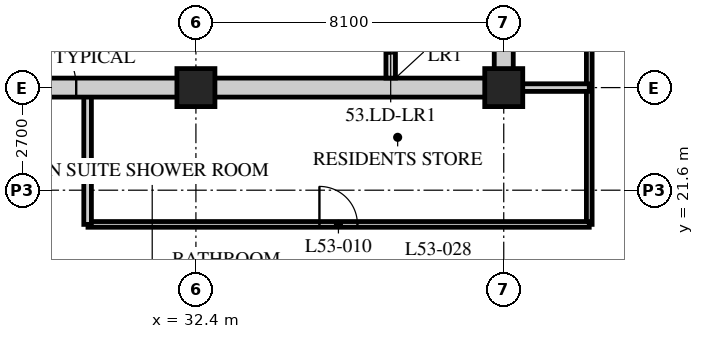
"""IFC4 building model, lengths in metres.
Left out: names, types, materials, properties, quantities, classifications, styles, units other than length and angle.
Written with IfcOpenShell. Run it as: python <this file> out.ifc"""

import sys

from ifc_helpers import new_model, si_unit, direction, frame, frame_2d, origin, origin_2d, place, context, subcontext, project, spatial, rectangle, hollow_rectangle, extrude, element, fill, save


model = new_model("IFC4")
c1 = context("Model", 3, precision=1e-05, world=origin(), true_north=direction((0.0, 1.0)))
c2 = subcontext(c1, "Body", "Model", "MODEL_VIEW")
j1 = project(units=[si_unit("LENGTHUNIT", "METRE"), si_unit("PLANEANGLEUNIT", "RADIAN")], contexts=[c1])
p1 = place(None, origin())
s1 = spatial("IfcSite", under=j1, at=p1, CompositionType="ELEMENT")
p2 = place(p1, origin())
s2 = spatial("IfcBuilding", under=s1, at=p2, CompositionType="ELEMENT")
p3 = place(p2, frame((0.0, 0.0, 206.4)))
s3 = spatial("IfcBuildingStorey", under=s2, at=p3, CompositionType="ELEMENT", Elevation=206.4)
for number, where, z_axis, x_axis in (
    (1, (32.4, 24.3, 0.0), (0.0, 0.0, 1.0), (1.0, 0.0, 0.0)),
    (2, (40.5, 24.3, 0.0), (0.0, 0.0, 1.0), (1.0, 0.0, 0.0)),
):
    element("IfcColumn", number, at=place(p3, frame(where, z_axis=z_axis, x_axis=x_axis)), inside=s3, PredefinedType="COLUMN", context=c2, shape_type="SweptSolid", body=[
        extrude(hollow_rectangle(XDim=1.0, YDim=1.0, WallThickness=0.1, at=origin_2d()), origin(), (0.0, 0.0, 1.0), 3.6),
    ])
p4 = place(p3, frame((42.75, 20.7, 0.0), z_axis=(0.0, 0.0, 1.0), x_axis=(0.0, 1.0, 0.0)))
e3 = element("IfcWall", 3, at=p4, inside=s3, PredefinedType="PARTITIONING", context=c2, shape_type="SweptSolid", body=[
    extrude(rectangle(XDim=24.75, YDim=0.15, at=frame_2d((12.375, 0.0))), origin(), (0.0, 0.0, 1.0), 3.39),
])
p5 = place(p4, frame((7.15, 0.0, 0.0)))
e4 = element("IfcOpeningElement", 4, at=p5, cuts=e3, PredefinedType="OPENING", context=c2, shape_type="SweptSolid", body=[
    extrude(rectangle(XDim=1.0, YDim=2.1, at=frame_2d((0.5, 1.05))), frame((0.0, 0.085, 0.0), z_axis=(0.0, -1.0, 0.0), x_axis=(1.0, 0.0, 0.0)), (0.0, 0.0, 1.0), 0.17),
])
p6 = place(p4, frame((15.25, 0.0, 0.0)))
e5 = element("IfcOpeningElement", 5, at=p6, cuts=e3, PredefinedType="OPENING", context=c2, shape_type="SweptSolid", body=[
    extrude(rectangle(XDim=1.0, YDim=2.1, at=frame_2d((0.5, 1.05))), frame((0.0, 0.085, 0.0), z_axis=(0.0, -1.0, 0.0), x_axis=(1.0, 0.0, 0.0)), (0.0, 0.0, 1.0), 0.17),
])
p7 = place(p3, frame((29.56, 20.7, 0.0), z_axis=(0.0, 0.0, 1.0), x_axis=(1.0, 0.0, 0.0)))
e6 = element("IfcWall", 6, at=p7, inside=s3, PredefinedType="PARTITIONING", context=c2, shape_type="SweptSolid", body=[
    extrude(rectangle(XDim=13.19, YDim=0.15, at=frame_2d((6.595, 0.0))), origin(), (0.0, 0.0, 1.0), 3.39),
])
p8 = place(p7, frame((6.09, 0.0, 0.0)))
e7 = element("IfcOpeningElement", 7, at=p8, cuts=e6, PredefinedType="OPENING", context=c2, shape_type="SweptSolid", body=[
    extrude(rectangle(XDim=1.0, YDim=2.1, at=frame_2d((0.5, 1.05))), frame((0.0, 0.085, 0.0), z_axis=(0.0, -1.0, 0.0), x_axis=(1.0, 0.0, 0.0)), (0.0, 0.0, 1.0), 0.17),
])
p9 = place(p3, frame((29.55, 20.7, 0.0), z_axis=(0.0, 0.0, 1.0), x_axis=(0.0, 1.0, 0.0)))
e8 = element("IfcWall", 8, at=p9, inside=s3, PredefinedType="SOLIDWALL", context=c2, shape_type="SweptSolid", body=[
    extrude(rectangle(XDim=3.6, YDim=0.2, at=frame_2d((1.8, 0.0))), origin(), (0.0, 0.0, 1.0), 3.39),
])
p10 = place(p3, frame((40.5, 24.3, 0.0), z_axis=(0.0, 0.0, 1.0), x_axis=(1.0, 0.0, 0.0)))
e9 = element("IfcWall", 9, at=p10, inside=s3, PredefinedType="SOLIDWALL", context=c2, shape_type="SweptSolid", body=[
    extrude(rectangle(XDim=2.25, YDim=0.2, at=frame_2d((1.125, 0.0))), origin(), (0.0, 0.0, 1.0), 3.39),
])
p11 = place(p3, frame((15.95, 24.3, 0.0), z_axis=(0.0, 0.0, 1.0), x_axis=(1.0, 0.0, 0.0)))
e10 = element("IfcWall", 10, at=p11, inside=s3, PredefinedType="SOLIDWALL", context=c2, shape_type="SweptSolid", body=[
    extrude(rectangle(XDim=24.8, YDim=0.5, at=frame_2d((12.4, 0.0))), origin(), (0.0, 0.0, 1.0), 2.74),
])
p12 = place(p11, frame((11.5, 0.0, 0.0)))
e11 = element("IfcOpeningElement", 11, at=p12, cuts=e10, PredefinedType="OPENING", context=c2, shape_type="SweptSolid", body=[
    extrude(rectangle(XDim=1.8, YDim=2.4, at=frame_2d((0.9, 1.2))), frame((0.0, 0.26, 0.0), z_axis=(0.0, -1.0, 0.0), x_axis=(1.0, 0.0, 0.0)), (0.0, 0.0, 1.0), 0.52),
])
p13 = place(p3, frame((40.5, 24.55, 0.0), z_axis=(0.0, 0.0, 1.0), x_axis=(0.0, 1.0, 0.0)))
e12 = element("IfcWall", 12, at=p13, inside=s3, PredefinedType="SOLIDWALL", context=c2, shape_type="SweptSolid", body=[
    extrude(rectangle(XDim=15.7, YDim=0.5, at=frame_2d((7.85, 0.0))), origin(), (0.0, 0.0, 1.0), 2.778),
])
p14 = place(p3, frame((37.525, 24.55, 0.0), z_axis=(0.0, 0.0, 1.0), x_axis=(0.0, 1.0, 0.0)))
e13 = element("IfcWall", 13, at=p14, inside=s3, PredefinedType="SOLIDWALL", context=c2, shape_type="SweptSolid", body=[
    extrude(rectangle(XDim=7.75, YDim=0.25, at=frame_2d((3.875, 0.0))), origin(), (0.0, 0.0, 1.0), 3.39),
])
p15 = place(p14, frame((0.65, 0.0, 0.0)))
e14 = element("IfcOpeningElement", 14, at=p15, cuts=e13, PredefinedType="OPENING", context=c2, shape_type="SweptSolid", body=[
    extrude(rectangle(XDim=1.1, YDim=2.4, at=frame_2d((0.55, 1.2))), frame((0.0, 0.135, 0.0), z_axis=(0.0, -1.0, 0.0), x_axis=(1.0, 0.0, 0.0)), (0.0, 0.0, 1.0), 0.27),
])
p16 = place(p14, frame((3.25, 0.0, 0.0)))
e15 = element("IfcOpeningElement", 15, at=p16, cuts=e13, PredefinedType="OPENING", context=c2, shape_type="SweptSolid", body=[
    extrude(rectangle(XDim=1.1, YDim=2.4, at=frame_2d((0.55, 1.2))), frame((0.0, 0.135, 0.0), z_axis=(0.0, -1.0, 0.0), x_axis=(1.0, 0.0, 0.0)), (0.0, 0.0, 1.0), 0.27),
])
p17 = place(p14, frame((5.85, 0.0, 0.0)))
e16 = element("IfcOpeningElement", 16, at=p17, cuts=e13, PredefinedType="OPENING", context=c2, shape_type="SweptSolid", body=[
    extrude(rectangle(XDim=1.1, YDim=2.4, at=frame_2d((0.55, 1.2))), frame((0.0, 0.135, 0.0), z_axis=(0.0, -1.0, 0.0), x_axis=(1.0, 0.0, 0.0)), (0.0, 0.0, 1.0), 0.27),
])
p18 = place(p8, origin())
e17 = element("IfcDoor", 17, at=p18, inside=s3, OperationType="SINGLE_SWING_LEFT", PredefinedType="DOOR", context=c2, shape_type="SweptSolid", body=[
    extrude(rectangle(XDim=1.0, YDim=2.1, at=frame_2d((0.5, 1.05))), frame((0.0, 0.025, 0.0), z_axis=(0.0, -1.0, 0.0), x_axis=(1.0, 0.0, 0.0)), (0.0, 0.0, 1.0), 0.05),
])
fill(e7, e17)
p19 = place(p15, origin())
e18 = element("IfcDoor", 18, at=p19, inside=s3, OperationType="DOUBLE_DOOR_SLIDING", PredefinedType="DOOR", context=c2, shape_type="SweptSolid", body=[
    extrude(rectangle(XDim=1.1, YDim=2.4, at=frame_2d((0.55, 1.2))), frame((0.0, 0.025, 0.0), z_axis=(0.0, -1.0, 0.0), x_axis=(1.0, 0.0, 0.0)), (0.0, 0.0, 1.0), 0.05),
])
fill(e14, e18)
p20 = place(p12, origin())
e19 = element("IfcDoor", 19, at=p20, inside=s3, OperationType="DOUBLE_DOOR_SINGLE_SWING", PredefinedType="DOOR", context=c2, shape_type="SweptSolid", body=[
    extrude(rectangle(XDim=1.8, YDim=2.4, at=frame_2d((0.9, 1.2))), frame((0.0, 0.025, 0.0), z_axis=(0.0, -1.0, 0.0), x_axis=(1.0, 0.0, 0.0)), (0.0, 0.0, 1.0), 0.05),
])
fill(e11, e19)
save(model, sys.argv[1])
